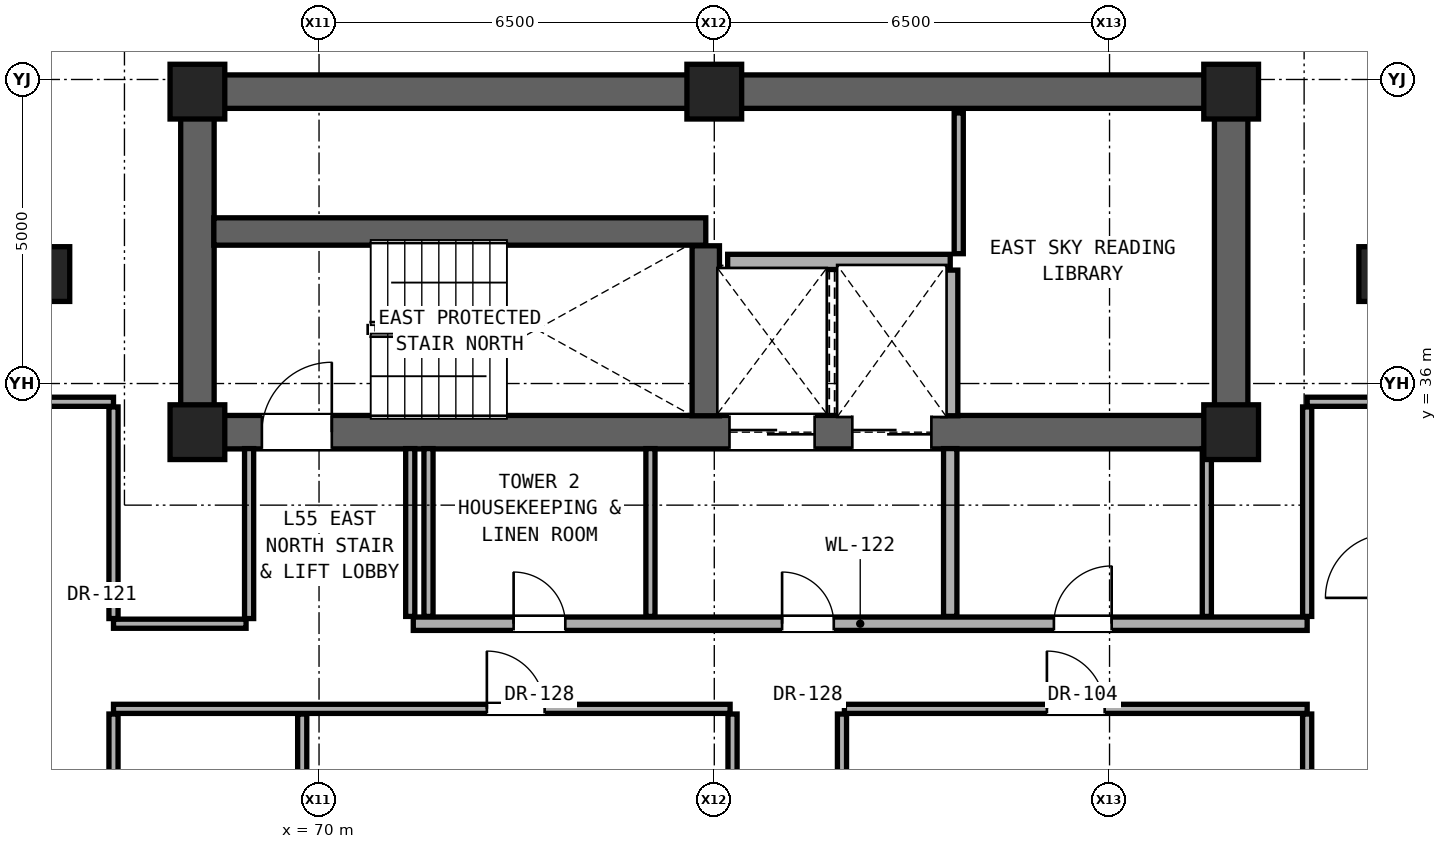
"""IFC4 building model, lengths in metres.
Left out: names, types, materials, properties, quantities, classifications, styles, units other than length and angle.
Written with IfcOpenShell. Run it as: python <this file> out.ifc"""

import sys

from ifc_helpers import new_model, si_unit, direction, frame, frame_2d, origin, origin_2d, place, context, subcontext, project, spatial, rectangle, extrude, element, fill, save


model = new_model("IFC4")
c1 = context("Model", 3, precision=1e-05, world=origin(), true_north=direction((0.0, 1.0)))
c2 = subcontext(c1, "Body", "Model", "MODEL_VIEW")
j1 = project(units=[si_unit("LENGTHUNIT", "METRE"), si_unit("PLANEANGLEUNIT", "RADIAN")], contexts=[c1])
p1 = place(None, origin())
s1 = spatial("IfcSite", under=j1, at=p1, CompositionType="ELEMENT")
p2 = place(p1, origin())
s2 = spatial("IfcBuilding", under=s1, at=p2, CompositionType="ELEMENT")
p3 = place(p2, frame((0.0, 0.0, 193.4)))
s3 = spatial("IfcBuildingStorey", under=s2, at=p3, CompositionType="ELEMENT", Elevation=193.4)
for number, where, z_axis, x_axis in (
    (1, (68.0, 35.2, 0.0), (0.0, 0.0, 1.0), (1.0, 0.0, 0.0)),
    (2, (85.0, 35.2, 0.0), (0.0, 0.0, 1.0), (1.0, 0.0, 0.0)),
    (3, (68.0, 40.8, 0.0), (0.0, 0.0, 1.0), (1.0, 0.0, 0.0)),
    (4, (76.5, 40.8, 0.0), (0.0, 0.0, 1.0), (1.0, 0.0, 0.0)),
    (5, (85.0, 40.8, 0.0), (0.0, 0.0, 1.0), (1.0, 0.0, 0.0)),
):
    element("IfcColumn", number, at=place(p3, frame(where, z_axis=z_axis, x_axis=x_axis)), inside=s3, PredefinedType="COLUMN", context=c2, shape_type="SweptSolid", body=[
        extrude(rectangle(XDim=0.9, YDim=0.9, at=origin_2d()), origin(), (0.0, 0.0, 1.0), 3.25),
    ])
for number, where, z_axis, x_axis in (
    (6, (65.6, 37.8, 0.0), (0.0, 0.0, 1.0), (1.0, 0.0, 0.0)),
    (7, (87.4, 37.8, 0.0), (0.0, 0.0, 1.0), (1.0, 0.0, 0.0)),
):
    element("IfcColumn", number, at=place(p3, frame(where, z_axis=z_axis, x_axis=x_axis)), inside=s3, PredefinedType="PILASTER", context=c2, shape_type="SweptSolid", body=[
        extrude(rectangle(XDim=0.6, YDim=0.9, at=origin_2d()), origin(), (0.0, 0.0, 1.0), 3.25),
    ])
p4 = place(p3, frame((68.0, 40.8, 0.0), z_axis=(0.0, 0.0, 1.0), x_axis=(1.0, 0.0, 0.0)))
e8 = element("IfcWall", 8, at=p4, inside=s3, PredefinedType="SHEAR", context=c2, shape_type="SweptSolid", body=[
    extrude(rectangle(XDim=17.0, YDim=0.55, at=frame_2d((8.5, 0.0))), origin(), (0.0, 0.0, 1.0), 3.05),
])
for number, where, z_axis, x_axis in (
    (9, (68.0, 35.2, 0.0), (0.0, 0.0, 1.0), (0.0, 1.0, 0.0)),
    (10, (85.0, 35.2, 0.0), (0.0, 0.0, 1.0), (0.0, 1.0, 0.0)),
):
    element("IfcWall", number, at=place(p3, frame(where, z_axis=z_axis, x_axis=x_axis)), inside=s3, PredefinedType="SHEAR", context=c2, shape_type="SweptSolid", body=[
        extrude(rectangle(XDim=5.6, YDim=0.55, at=frame_2d((2.8, 0.0))), origin(), (0.0, 0.0, 1.0), 3.05),
    ])
p5 = place(p3, frame((68.0, 35.2, 0.0), z_axis=(0.0, 0.0, 1.0), x_axis=(1.0, 0.0, 0.0)))
e11 = element("IfcWall", 11, at=p5, inside=s3, PredefinedType="SHEAR", context=c2, shape_type="SweptSolid", body=[
    extrude(rectangle(XDim=17.0, YDim=0.55, at=frame_2d((8.5, 0.0))), origin(), (0.0, 0.0, 1.0), 3.05),
])
p6 = place(p5, frame((1.06, 0.0, 0.0)))
e12 = element("IfcOpeningElement", 12, at=p6, cuts=e11, PredefinedType="OPENING", context=c2, shape_type="SweptSolid", body=[
    extrude(rectangle(XDim=1.15, YDim=2.2, at=frame_2d((0.575, 1.1))), frame((0.0, 0.285, 0.0), z_axis=(0.0, -1.0, 0.0), x_axis=(1.0, 0.0, 0.0)), (0.0, 0.0, 1.0), 0.57),
])
p7 = place(p5, frame((8.75, 0.0, 0.0)))
e13 = element("IfcOpeningElement", 13, at=p7, cuts=e11, PredefinedType="OPENING", context=c2, shape_type="SweptSolid", body=[
    extrude(rectangle(XDim=1.4, YDim=2.35, at=frame_2d((0.7, 1.175))), frame((0.0, 0.285, 0.0), z_axis=(0.0, -1.0, 0.0), x_axis=(1.0, 0.0, 0.0)), (0.0, 0.0, 1.0), 0.57),
])
p8 = place(p5, frame((10.77, 0.0, 0.0)))
e14 = element("IfcOpeningElement", 14, at=p8, cuts=e11, PredefinedType="OPENING", context=c2, shape_type="SweptSolid", body=[
    extrude(rectangle(XDim=1.3, YDim=2.3, at=frame_2d((0.65, 1.15))), frame((0.0, 0.285, 0.0), z_axis=(0.0, -1.0, 0.0), x_axis=(1.0, 0.0, 0.0)), (0.0, 0.0, 1.0), 0.57),
])
p9 = place(p3, frame((66.62, 30.65, 0.0), z_axis=(0.0, 0.0, 1.0), x_axis=(1.0, 0.0, 0.0)))
e15 = element("IfcWall", 15, at=p9, inside=s3, PredefinedType="PARTITIONING", context=c2, shape_type="SweptSolid", body=[
    extrude(rectangle(XDim=10.14, YDim=0.15, at=frame_2d((5.07, 0.0))), origin(), (0.0, 0.0, 1.0), 2.186),
])
p10 = place(p9, frame((6.14, 0.0, 0.0)))
e16 = element("IfcOpeningElement", 16, at=p10, cuts=e15, PredefinedType="OPENING", context=c2, shape_type="SweptSolid", body=[
    extrude(rectangle(XDim=0.95, YDim=2.15, at=frame_2d((0.475, 1.075))), frame((0.0, 0.085, 0.0), z_axis=(0.0, -1.0, 0.0), x_axis=(1.0, 0.0, 0.0)), (0.0, 0.0, 1.0), 0.17),
])
p11 = place(p3, frame((78.64, 30.65, 0.0), z_axis=(0.0, 0.0, 1.0), x_axis=(1.0, 0.0, 0.0)))
e17 = element("IfcWall", 17, at=p11, inside=s3, PredefinedType="PARTITIONING", context=c2, shape_type="SweptSolid", body=[
    extrude(rectangle(XDim=7.61, YDim=0.15, at=frame_2d((3.805, 0.0))), origin(), (0.0, 0.0, 1.0), 2.186),
])
p12 = place(p11, frame((3.33, 0.0, 0.0)))
e18 = element("IfcOpeningElement", 18, at=p12, cuts=e17, PredefinedType="OPENING", context=c2, shape_type="SweptSolid", body=[
    extrude(rectangle(XDim=0.95, YDim=2.15, at=frame_2d((0.475, 1.075))), frame((0.0, 0.085, 0.0), z_axis=(0.0, -1.0, 0.0), x_axis=(1.0, 0.0, 0.0)), (0.0, 0.0, 1.0), 0.17),
])
p13 = place(p3, frame((66.62, 32.05, 0.0), z_axis=(0.0, 0.0, 1.0), x_axis=(1.0, 0.0, 0.0)))
e19 = element("IfcWall", 19, at=p13, inside=s3, PredefinedType="PARTITIONING", context=c2, shape_type="SweptSolid", body=[
    extrude(rectangle(XDim=2.18, YDim=0.15, at=frame_2d((1.09, 0.0))), origin(), (0.0, 0.0, 1.0), 2.186),
])
p14 = place(p3, frame((71.55, 32.05, 0.0), z_axis=(0.0, 0.0, 1.0), x_axis=(1.0, 0.0, 0.0)))
e20 = element("IfcWall", 20, at=p14, inside=s3, PredefinedType="SOLIDWALL", context=c2, shape_type="SweptSolid", body=[
    extrude(rectangle(XDim=14.7, YDim=0.22, at=frame_2d((7.35, 0.0))), origin(), (0.0, 0.0, 1.0), 2.186),
])
p15 = place(p14, frame((6.065, 0.0, 0.0)))
e21 = element("IfcOpeningElement", 21, at=p15, cuts=e20, PredefinedType="OPENING", context=c2, shape_type="SweptSolid", body=[
    extrude(rectangle(XDim=0.85, YDim=2.01, at=frame_2d((0.425, 1.005))), frame((0.0, 0.12, 0.0), z_axis=(0.0, -1.0, 0.0), x_axis=(1.0, 0.0, 0.0)), (0.0, 0.0, 1.0), 0.24),
])
p16 = place(p14, frame((10.535, 0.0, 0.0)))
e22 = element("IfcOpeningElement", 22, at=p16, cuts=e20, PredefinedType="OPENING", context=c2, shape_type="SweptSolid", body=[
    extrude(rectangle(XDim=0.95, YDim=2.15, at=frame_2d((0.475, 1.075))), frame((0.0, 0.12, 0.0), z_axis=(0.0, -1.0, 0.0), x_axis=(1.0, 0.0, 0.0)), (0.0, 0.0, 1.0), 0.24),
])
p17 = place(p14, frame((1.65, 0.0, 0.0)))
e23 = element("IfcOpeningElement", 23, at=p17, cuts=e20, PredefinedType="OPENING", context=c2, shape_type="SweptSolid", body=[
    extrude(rectangle(XDim=0.85, YDim=2.01, at=frame_2d((0.425, 1.005))), frame((0.0, 0.12, 0.0), z_axis=(0.0, -1.0, 0.0), x_axis=(1.0, 0.0, 0.0)), (0.0, 0.0, 1.0), 0.24),
])
p18 = place(p3, frame((65.25, 35.7, 0.0), z_axis=(0.0, 0.0, 1.0), x_axis=(1.0, 0.0, 0.0)))
e24 = element("IfcWall", 24, at=p18, inside=s3, PredefinedType="PARTITIONING", context=c2, shape_type="SweptSolid", body=[
    extrude(rectangle(XDim=1.37, YDim=0.15, at=frame_2d((0.685, 0.0))), origin(), (0.0, 0.0, 1.0), 3.05),
])
p19 = place(p3, frame((86.25, 35.7, 0.0), z_axis=(0.0, 0.0, 1.0), x_axis=(1.0, 0.0, 0.0)))
e25 = element("IfcWall", 25, at=p19, inside=s3, PredefinedType="PARTITIONING", context=c2, shape_type="SweptSolid", body=[
    extrude(rectangle(XDim=1.35, YDim=0.15, at=frame_2d((0.675, 0.0))), origin(), (0.0, 0.0, 1.0), 3.05),
])
p20 = place(p3, frame((76.72, 38.0, 0.0), z_axis=(0.0, 0.0, 1.0), x_axis=(1.0, 0.0, 0.0)))
e26 = element("IfcWall", 26, at=p20, inside=s3, PredefinedType="SOLIDWALL", context=c2, shape_type="SweptSolid", body=[
    extrude(rectangle(XDim=3.66, YDim=0.25, at=frame_2d((1.83, 0.0))), origin(), (0.0, 0.0, 1.0), 3.05),
])
p21 = place(p3, frame((68.27, 38.5, 0.0), z_axis=(0.0, 0.0, 1.0), x_axis=(1.0, 0.0, 0.0)))
e27 = element("IfcWall", 27, at=p21, inside=s3, PredefinedType="SHEAR", context=c2, shape_type="SweptSolid", body=[
    extrude(rectangle(XDim=8.09, YDim=0.45, at=frame_2d((4.045, 0.0))), origin(), (0.0, 0.0, 1.0), 3.05),
])
p22 = place(p3, frame((66.62, 24.935, 0.0), z_axis=(0.0, 0.0, 1.0), x_axis=(0.0, 1.0, 0.0)))
e28 = element("IfcWall", 28, at=p22, inside=s3, PredefinedType="PARTITIONING", context=c2, shape_type="SweptSolid", body=[
    extrude(rectangle(XDim=5.63, YDim=0.15, at=frame_2d((2.815, 0.0))), origin(), (0.0, 0.0, 1.0), 2.346),
])
p23 = place(p22, frame((2.34, 0.0, 0.0)))
e29 = element("IfcOpeningElement", 29, at=p23, cuts=e28, PredefinedType="OPENING", context=c2, shape_type="SweptSolid", body=[
    extrude(rectangle(XDim=0.95, YDim=2.15, at=frame_2d((0.475, 1.075))), frame((0.0, 0.085, 0.0), z_axis=(0.0, -1.0, 0.0), x_axis=(1.0, 0.0, 0.0)), (0.0, 0.0, 1.0), 0.17),
])
p24 = place(p3, frame((66.62, 32.135, 0.0), z_axis=(0.0, 0.0, 1.0), x_axis=(0.0, 1.0, 0.0)))
e30 = element("IfcWall", 30, at=p24, inside=s3, PredefinedType="PARTITIONING", context=c2, shape_type="SweptSolid", body=[
    extrude(rectangle(XDim=3.48, YDim=0.15, at=frame_2d((1.74, 0.0))), origin(), (0.0, 0.0, 1.0), 2.442),
])
p25 = place(p3, frame((68.85, 32.135, 0.0), z_axis=(0.0, 0.0, 1.0), x_axis=(0.0, 1.0, 0.0)))
e31 = element("IfcWall", 31, at=p25, inside=s3, PredefinedType="PARTITIONING", context=c2, shape_type="SweptSolid", body=[
    extrude(rectangle(XDim=2.795, YDim=0.15, at=frame_2d((1.397, 0.0))), origin(), (0.0, 0.0, 1.0), 3.05),
])
p26 = place(p3, frame((69.723, 24.935, 0.0), z_axis=(0.0, 0.0, 1.0), x_axis=(0.0, 1.0, 0.0)))
e32 = element("IfcWall", 32, at=p26, inside=s3, PredefinedType="PARTITIONING", context=c2, shape_type="SweptSolid", body=[
    extrude(rectangle(XDim=5.63, YDim=0.15, at=frame_2d((2.815, 0.0))), origin(), (0.0, 0.0, 1.0), 2.186),
])
for number, where, z_axis, x_axis in (
    (33, (71.5, 32.17, 0.0), (0.0, 0.0, 1.0), (0.0, 1.0, 0.0)),
    (34, (71.8, 32.17, 0.0), (0.0, 0.0, 1.0), (0.0, 1.0, 0.0)),
    (35, (75.45, 32.17, 0.0), (0.0, 0.0, 1.0), (0.0, 1.0, 0.0)),
):
    element("IfcWall", number, at=place(p3, frame(where, z_axis=z_axis, x_axis=x_axis)), inside=s3, PredefinedType="PARTITIONING", context=c2, shape_type="SweptSolid", body=[
        extrude(rectangle(XDim=2.76, YDim=0.15, at=frame_2d((1.38, 0.0))), origin(), (0.0, 0.0, 1.0), 3.05),
    ])
p27 = place(p3, frame((76.36, 35.47, 0.0), z_axis=(0.0, 0.0, 1.0), x_axis=(0.0, 1.0, 0.0)))
e36 = element("IfcWall", 36, at=p27, inside=s3, PredefinedType="SHEAR", context=c2, shape_type="SweptSolid", body=[
    extrude(rectangle(XDim=2.795, YDim=0.45, at=frame_2d((1.397, 0.0))), origin(), (0.0, 0.0, 1.0), 3.05),
])
p28 = place(p3, frame((76.8, 22.435, 0.0), z_axis=(0.0, 0.0, 1.0), x_axis=(0.0, 1.0, 0.0)))
e37 = element("IfcWall", 37, at=p28, inside=s3, PredefinedType="PARTITIONING", context=c2, shape_type="SweptSolid", body=[
    extrude(rectangle(XDim=8.13, YDim=0.15, at=frame_2d((4.065, 0.0))), origin(), (0.0, 0.0, 1.0), 2.186),
])
p29 = place(p3, frame((78.6, 27.485, 0.0), z_axis=(0.0, 0.0, 1.0), x_axis=(0.0, 1.0, 0.0)))
e38 = element("IfcWall", 38, at=p29, inside=s3, PredefinedType="PARTITIONING", context=c2, shape_type="SweptSolid", body=[
    extrude(rectangle(XDim=3.08, YDim=0.15, at=frame_2d((1.54, 0.0))), origin(), (0.0, 0.0, 1.0), 2.186),
])
p30 = place(p3, frame((80.38, 32.17, 0.0), z_axis=(0.0, 0.0, 1.0), x_axis=(0.0, 1.0, 0.0)))
e39 = element("IfcWall", 39, at=p30, inside=s3, PredefinedType="SOLIDWALL", context=c2, shape_type="SweptSolid", body=[
    extrude(rectangle(XDim=2.76, YDim=0.22, at=frame_2d((1.38, 0.0))), origin(), (0.0, 0.0, 1.0), 3.05),
])
p31 = place(p3, frame((80.38, 35.47, 0.0), z_axis=(0.0, 0.0, 1.0), x_axis=(0.0, 1.0, 0.0)))
e40 = element("IfcWall", 40, at=p31, inside=s3, PredefinedType="SOLIDWALL", context=c2, shape_type="SweptSolid", body=[
    extrude(rectangle(XDim=2.395, YDim=0.25, at=frame_2d((1.198, 0.0))), origin(), (0.0, 0.0, 1.0), 3.05),
])
p32 = place(p3, frame((80.52, 38.135, 0.0), z_axis=(0.0, 0.0, 1.0), x_axis=(0.0, 1.0, 0.0)))
e41 = element("IfcWall", 41, at=p32, inside=s3, PredefinedType="PARTITIONING", context=c2, shape_type="SweptSolid", body=[
    extrude(rectangle(XDim=2.315, YDim=0.15, at=frame_2d((1.157, 0.0))), origin(), (0.0, 0.0, 1.0), 3.05),
])
p33 = place(p3, frame((84.6, 32.17, 0.0), z_axis=(0.0, 0.0, 1.0), x_axis=(0.0, 1.0, 0.0)))
e42 = element("IfcWall", 42, at=p33, inside=s3, PredefinedType="PARTITIONING", context=c2, shape_type="SweptSolid", body=[
    extrude(rectangle(XDim=2.76, YDim=0.15, at=frame_2d((1.38, 0.0))), origin(), (0.0, 0.0, 1.0), 3.05),
])
p34 = place(p3, frame((86.25, 27.485, 0.0), z_axis=(0.0, 0.0, 1.0), x_axis=(0.0, 1.0, 0.0)))
e43 = element("IfcWall", 43, at=p34, inside=s3, PredefinedType="PARTITIONING", context=c2, shape_type="SweptSolid", body=[
    extrude(rectangle(XDim=3.08, YDim=0.15, at=frame_2d((1.54, 0.0))), origin(), (0.0, 0.0, 1.0), 2.346),
])
p35 = place(p3, frame((86.25, 32.17, 0.0), z_axis=(0.0, 0.0, 1.0), x_axis=(0.0, 1.0, 0.0)))
e44 = element("IfcWall", 44, at=p35, inside=s3, PredefinedType="PARTITIONING", context=c2, shape_type="SweptSolid", body=[
    extrude(rectangle(XDim=3.445, YDim=0.15, at=frame_2d((1.723, 0.0))), origin(), (0.0, 0.0, 1.0), 2.442),
])
p36 = place(p6, origin())
e45 = element("IfcDoor", 45, at=p36, inside=s3, OperationType="SINGLE_SWING_RIGHT", PredefinedType="DOOR", context=c2, shape_type="SweptSolid", body=[
    extrude(rectangle(XDim=1.15, YDim=2.2, at=frame_2d((0.575, 1.1))), frame((0.0, 0.025, 0.0), z_axis=(0.0, -1.0, 0.0), x_axis=(1.0, 0.0, 0.0)), (0.0, 0.0, 1.0), 0.05),
])
fill(e12, e45)
p37 = place(p15, origin())
e46 = element("IfcDoor", 46, at=p37, inside=s3, OperationType="SINGLE_SWING_LEFT", PredefinedType="DOOR", context=c2, shape_type="SweptSolid", body=[
    extrude(rectangle(XDim=0.85, YDim=2.01, at=frame_2d((0.425, 1.005))), frame((0.0, 0.025, 0.0), z_axis=(0.0, -1.0, 0.0), x_axis=(1.0, 0.0, 0.0)), (0.0, 0.0, 1.0), 0.05),
])
fill(e21, e46)
p38 = place(p16, origin())
e47 = element("IfcDoor", 47, at=p38, inside=s3, OperationType="SINGLE_SWING_RIGHT", PredefinedType="DOOR", context=c2, shape_type="SweptSolid", body=[
    extrude(rectangle(XDim=0.95, YDim=2.15, at=frame_2d((0.475, 1.075))), frame((0.0, 0.025, 0.0), z_axis=(0.0, -1.0, 0.0), x_axis=(1.0, 0.0, 0.0)), (0.0, 0.0, 1.0), 0.05),
])
fill(e22, e47)
p39 = place(p17, origin())
e48 = element("IfcDoor", 48, at=p39, inside=s3, OperationType="SINGLE_SWING_LEFT", PredefinedType="DOOR", context=c2, shape_type="SweptSolid", body=[
    extrude(rectangle(XDim=0.85, YDim=2.01, at=frame_2d((0.425, 1.005))), frame((0.0, 0.025, 0.0), z_axis=(0.0, -1.0, 0.0), x_axis=(1.0, 0.0, 0.0)), (0.0, 0.0, 1.0), 0.05),
])
fill(e23, e48)
p40 = place(p10, origin())
e49 = element("IfcDoor", 49, at=p40, inside=s3, OperationType="SINGLE_SWING_LEFT", PredefinedType="DOOR", context=c2, shape_type="SweptSolid", body=[
    extrude(rectangle(XDim=0.95, YDim=2.15, at=frame_2d((0.475, 1.075))), frame((0.0, 0.025, 0.0), z_axis=(0.0, -1.0, 0.0), x_axis=(1.0, 0.0, 0.0)), (0.0, 0.0, 1.0), 0.05),
])
fill(e16, e49)
p41 = place(p12, origin())
e50 = element("IfcDoor", 50, at=p41, inside=s3, OperationType="SINGLE_SWING_LEFT", PredefinedType="DOOR", context=c2, shape_type="SweptSolid", body=[
    extrude(rectangle(XDim=0.95, YDim=2.15, at=frame_2d((0.475, 1.075))), frame((0.0, 0.025, 0.0), z_axis=(0.0, -1.0, 0.0), x_axis=(1.0, 0.0, 0.0)), (0.0, 0.0, 1.0), 0.05),
])
fill(e18, e50)
p42 = place(p7, origin())
e51 = element("IfcDoor", 51, at=p42, inside=s3, OperationType="DOUBLE_DOOR_SLIDING", PredefinedType="DOOR", context=c2, shape_type="SweptSolid", body=[
    extrude(rectangle(XDim=1.4, YDim=2.35, at=frame_2d((0.7, 1.175))), frame((0.0, 0.025, 0.0), z_axis=(0.0, -1.0, 0.0), x_axis=(1.0, 0.0, 0.0)), (0.0, 0.0, 1.0), 0.05),
])
fill(e13, e51)
p43 = place(p8, origin())
e52 = element("IfcDoor", 52, at=p43, inside=s3, OperationType="DOUBLE_DOOR_SLIDING", PredefinedType="DOOR", context=c2, shape_type="SweptSolid", body=[
    extrude(rectangle(XDim=1.3, YDim=2.3, at=frame_2d((0.65, 1.15))), frame((0.0, 0.025, 0.0), z_axis=(0.0, -1.0, 0.0), x_axis=(1.0, 0.0, 0.0)), (0.0, 0.0, 1.0), 0.05),
])
fill(e14, e52)
save(model, sys.argv[1])
